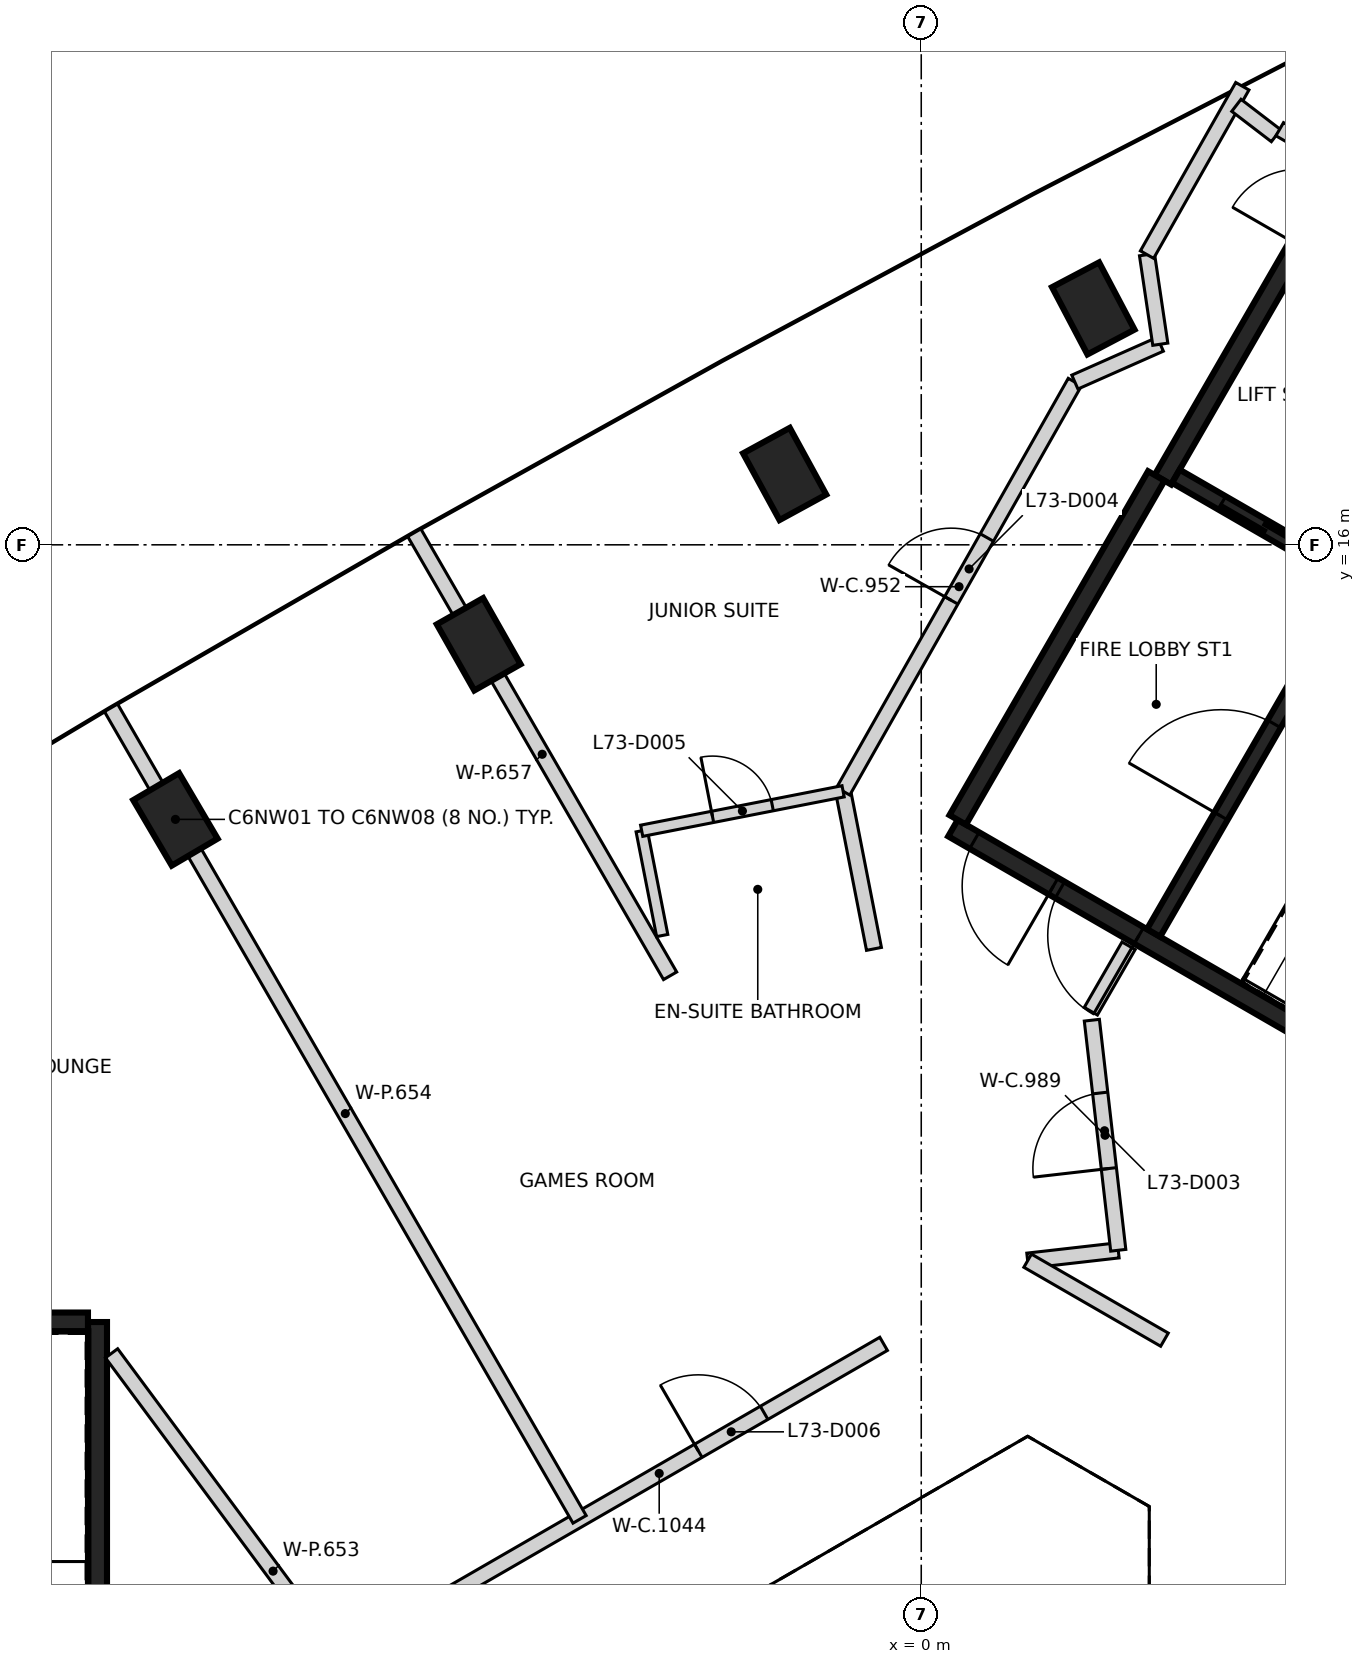
"""IFC4 building model, lengths in metres.
Left out: names, types, materials, properties, quantities, classifications, styles, units other than length and angle.
Written with IfcOpenShell. Run it as: python <this file> out.ifc"""

import sys

from ifc_helpers import new_model, si_unit, direction, frame, frame_2d, origin, origin_2d, place, context, subcontext, project, spatial, rectangle, extrude, element, fill, save


model = new_model("IFC4")
c1 = context("Model", 3, precision=1e-05, world=origin(), true_north=direction((0.0, 1.0)))
c2 = subcontext(c1, "Body", "Model", "MODEL_VIEW")
j1 = project(units=[si_unit("LENGTHUNIT", "METRE"), si_unit("PLANEANGLEUNIT", "RADIAN")], contexts=[c1])
p1 = place(None, origin())
s1 = spatial("IfcSite", under=j1, at=p1, CompositionType="ELEMENT")
p2 = place(p1, origin())
s2 = spatial("IfcBuilding", under=s1, at=p2, CompositionType="ELEMENT")
p3 = place(p2, frame((0.0, 0.0, 291.0)))
s3 = spatial("IfcBuildingStorey", under=s2, at=p3, CompositionType="ELEMENT", Elevation=291.0)
for number, where, z_axis, x_axis in (
    (1, (2.263, 19.11, -0.35), (0.0, 0.0, 1.0), (-0.466, 0.885, 0.0)),
    (2, (-1.797, 16.932, -0.35), (0.0, 0.0, 1.0), (-0.479, 0.878, 0.0)),
    (3, (-5.822, 14.691, -0.35), (0.0, 0.0, 1.0), (-0.493, 0.87, 0.0)),
    (4, (-9.812, 12.388, -0.35), (0.0, 0.0, 1.0), (-0.507, 0.862, 0.0)),
):
    element("IfcColumn", number, at=place(p3, frame(where, z_axis=z_axis, x_axis=x_axis)), inside=s3, PredefinedType="COLUMN", context=c2, shape_type="SweptSolid", body=[
        extrude(rectangle(XDim=1.0, YDim=0.7, at=origin_2d()), origin(), (0.0, 0.0, 1.0), 3.6),
    ])
p4 = place(p3, frame((-10.837, 5.775, 0.0), z_axis=(0.0, 0.0, 1.0), x_axis=(0.0, -1.0, 0.0)))
e5 = element("IfcWall", 5, at=p4, inside=s3, PredefinedType="SHEAR", context=c2, shape_type="SweptSolid", body=[
    extrude(rectangle(XDim=11.55, YDim=0.25, at=frame_2d((5.775, 0.0))), origin(), (0.0, 0.0, 1.0), 3.25),
])
p5 = place(p4, frame((10.025, 0.0, 0.0)))
e6 = element("IfcOpeningElement", 6, at=p5, cuts=e5, PredefinedType="OPENING", context=c2, shape_type="SweptSolid", body=[
    extrude(rectangle(XDim=1.2, YDim=2.1, at=frame_2d((0.6, 1.05))), frame((0.0, 0.135, 0.0), z_axis=(0.0, -1.0, 0.0), x_axis=(1.0, 0.0, 0.0)), (0.0, 0.0, 1.0), 0.27),
])
p6 = place(p4, frame((8.725, 0.0, 0.0)))
e7 = element("IfcOpeningElement", 7, at=p6, cuts=e5, PredefinedType="OPENING", context=c2, shape_type="SweptSolid", body=[
    extrude(rectangle(XDim=1.2, YDim=2.1, at=frame_2d((0.6, 1.05))), frame((0.0, 0.135, 0.0), z_axis=(0.0, -1.0, 0.0), x_axis=(1.0, 0.0, 0.0)), (0.0, 0.0, 1.0), 0.27),
])
p7 = place(p3, frame((-16.472, 5.775, 0.0), z_axis=(0.0, 0.0, 1.0), x_axis=(1.0, 0.0, 0.0)))
e8 = element("IfcWall", 8, at=p7, inside=s3, PredefinedType="SHEAR", context=c2, shape_type="SweptSolid", body=[
    extrude(rectangle(XDim=5.51, YDim=0.25, at=frame_2d((2.755, 0.0))), origin(), (0.0, 0.0, 1.0), 3.25),
])
p8 = place(p3, frame((10.42, 6.498, 0.0), z_axis=(0.0, 0.0, 1.0), x_axis=(-0.866021906294, 0.500006057782, 0.0)))
e9 = element("IfcWall", 9, at=p8, inside=s3, PredefinedType="SHEAR", context=c2, shape_type="SweptSolid", body=[
    extrude(rectangle(XDim=11.55, YDim=0.25, at=frame_2d((5.775, 0.0))), origin(), (0.0, 0.0, 1.0), 3.25),
])
p9 = place(p8, frame((10.025, 0.0, 0.0)))
e10 = element("IfcOpeningElement", 10, at=p9, cuts=e9, PredefinedType="OPENING", context=c2, shape_type="SweptSolid", body=[
    extrude(rectangle(XDim=1.2, YDim=2.1, at=frame_2d((0.6, 1.05))), frame((0.0, 0.135, 0.0), z_axis=(0.0, -1.0, 0.0), x_axis=(1.0, 0.0, 0.0)), (0.0, 0.0, 1.0), 0.27),
])
p10 = place(p8, frame((8.725, 0.0, 0.0)))
e11 = element("IfcOpeningElement", 11, at=p10, cuts=e9, PredefinedType="OPENING", context=c2, shape_type="SweptSolid", body=[
    extrude(rectangle(XDim=1.2, YDim=2.1, at=frame_2d((0.6, 1.05))), frame((0.0, 0.135, 0.0), z_axis=(0.0, -1.0, 0.0), x_axis=(1.0, 0.0, 0.0)), (0.0, 0.0, 1.0), 0.27),
])
p11 = place(p3, frame((3.179, 16.856, 0.0), z_axis=(0.0, 0.0, 1.0), x_axis=(0.500001955336, 0.866024274868, 0.0)))
e12 = element("IfcWall", 12, at=p11, inside=s3, PredefinedType="SHEAR", context=c2, shape_type="SweptSolid", body=[
    extrude(rectangle(XDim=6.125, YDim=0.25, at=frame_2d((3.062, 0.0))), origin(), (0.0, 0.0, 1.0), 3.25),
])
p12 = place(p11, frame((3.563, 0.0, 0.0)))
e13 = element("IfcOpeningElement", 13, at=p12, cuts=e12, PredefinedType="OPENING", context=c2, shape_type="SweptSolid", body=[
    extrude(rectangle(XDim=1.0, YDim=2.1, at=frame_2d((0.5, 1.05))), frame((0.0, 0.135, 0.0), z_axis=(0.0, -1.0, 0.0), x_axis=(1.0, 0.0, 0.0)), (0.0, 0.0, 1.0), 0.27),
])
p13 = place(p3, frame((0.48, 12.381, 0.0), z_axis=(0.0, 0.0, 1.0), x_axis=(0.49999885962, 0.866026062182, 0.0)))
e14 = element("IfcWall", 14, at=p13, inside=s3, PredefinedType="SHEAR", context=c2, shape_type="SweptSolid", body=[
    extrude(rectangle(XDim=5.225, YDim=0.25, at=frame_2d((2.612, 0.0))), origin(), (0.0, 0.0, 1.0), 3.25),
])
p14 = place(p3, frame((3.057, 10.895, 0.0), z_axis=(0.0, 0.0, 1.0), x_axis=(0.500027839223, 0.866009330205, 0.0)))
e15 = element("IfcWall", 15, at=p14, inside=s3, PredefinedType="SHEAR", context=c2, shape_type="SweptSolid", body=[
    extrude(rectangle(XDim=5.098, YDim=0.2, at=frame_2d((2.549, 0.0))), origin(), (0.0, 0.0, 1.0), 3.25),
])
p15 = place(p14, frame((1.774, 0.0, 0.0)))
e16 = element("IfcOpeningElement", 16, at=p15, cuts=e15, PredefinedType="OPENING", context=c2, shape_type="SweptSolid", body=[
    extrude(rectangle(XDim=1.4, YDim=2.1, at=frame_2d((0.7, 1.05))), frame((0.0, 0.11, 0.0), z_axis=(0.0, -1.0, 0.0), x_axis=(1.0, 0.0, 0.0)), (0.0, 0.0, 1.0), 0.22),
])
p16 = place(p3, frame((5.646, 15.576, 0.0), z_axis=(0.0, 0.0, 1.0), x_axis=(-0.866018407898, 0.500012117035, 0.0)))
e17 = element("IfcWall", 17, at=p16, inside=s3, PredefinedType="SHEAR", context=c2, shape_type="SweptSolid", body=[
    extrude(rectangle(XDim=2.651, YDim=0.2, at=frame_2d((1.325, 0.0))), origin(), (0.0, 0.0, 1.0), 3.25),
])
p17 = place(p16, frame((0.652, 0.0, 0.0)))
e18 = element("IfcOpeningElement", 18, at=p17, cuts=e17, PredefinedType="OPENING", context=c2, shape_type="SweptSolid", body=[
    extrude(rectangle(XDim=1.3, YDim=2.1, at=frame_2d((0.65, 1.05))), frame((0.0, 0.11, 0.0), z_axis=(0.0, -1.0, 0.0), x_axis=(1.0, 0.0, 0.0)), (0.0, 0.0, 1.0), 0.22),
])
p18 = place(p3, frame((-6.4, 2.079, 0.0), z_axis=(0.0, 0.0, 1.0), x_axis=(0.866037708501, 0.499978687001, 0.0)))
e19 = element("IfcWall", 19, at=p18, inside=s3, PredefinedType="PARTITIONING", context=c2, shape_type="SweptSolid", body=[
    extrude(rectangle(XDim=6.818, YDim=0.2, at=frame_2d((3.409, 0.0))), origin(), (0.0, 0.0, 1.0), 3.25),
])
p19 = place(p18, frame((4.003, 0.0, 0.0)))
e20 = element("IfcOpeningElement", 20, at=p19, cuts=e19, PredefinedType="OPENING", context=c2, shape_type="SweptSolid", body=[
    extrude(rectangle(XDim=1.0, YDim=2.1, at=frame_2d((0.5, 1.05))), frame((0.0, 0.11, 0.0), z_axis=(0.0, -1.0, 0.0), x_axis=(1.0, 0.0, 0.0)), (0.0, 0.0, 1.0), 0.22),
])
p20 = place(p3, frame((-1.028, 12.757, 0.0), z_axis=(0.0, 0.0, 1.0), x_axis=(0.192202773855, -0.981355233197, 0.0)))
e21 = element("IfcWall", 21, at=p20, inside=s3, PredefinedType="PARTITIONING", context=c2, shape_type="SweptSolid", body=[
    extrude(rectangle(XDim=2.112, YDim=0.2, at=frame_2d((1.056, 0.0))), origin(), (0.0, 0.0, 1.0), 3.25),
])
p21 = place(p3, frame((-1.027, 12.757, 0.0), z_axis=(0.0, 0.0, 1.0), x_axis=(0.492663063759, 0.870220147783, 0.0)))
e22 = element("IfcWall", 22, at=p21, inside=s3, PredefinedType="PARTITIONING", context=c2, shape_type="SweptSolid", body=[
    extrude(rectangle(XDim=6.187, YDim=0.2, at=frame_2d((3.094, 0.0))), origin(), (0.0, 0.0, 1.0), 3.25),
])
p22 = place(p21, frame((2.887, 0.0, 0.0)))
e23 = element("IfcOpeningElement", 23, at=p22, cuts=e22, PredefinedType="OPENING", context=c2, shape_type="SweptSolid", body=[
    extrude(rectangle(XDim=0.95, YDim=2.1, at=frame_2d((0.475, 1.05))), frame((0.0, 0.11, 0.0), z_axis=(0.0, -1.0, 0.0), x_axis=(1.0, 0.0, 0.0)), (0.0, 0.0, 1.0), 0.22),
])
p23 = place(p3, frame((1.4, 6.582, 0.0), z_axis=(0.0, 0.0, 1.0), x_axis=(0.993556915844, 0.11333426216, 0.0)))
e24 = element("IfcWall", 24, at=p23, inside=s3, PredefinedType="PARTITIONING", context=c2, shape_type="SweptSolid", body=[
    extrude(rectangle(XDim=1.2, YDim=0.2, at=frame_2d((0.6, 0.0))), origin(), (0.0, 0.0, 1.0), 3.25),
])
p24 = place(p3, frame((1.4, 6.582, 0.0), z_axis=(0.0, 0.0, 1.0), x_axis=(0.866066271601, -0.499929208183, 0.0)))
e25 = element("IfcWall", 25, at=p24, inside=s3, PredefinedType="PARTITIONING", context=c2, shape_type="SweptSolid", body=[
    extrude(rectangle(XDim=2.078, YDim=0.2, at=frame_2d((1.039, 0.0))), origin(), (0.0, 0.0, 1.0), 3.25),
])
p25 = place(p3, frame((2.021, 18.141, 0.0), z_axis=(0.0, 0.0, 1.0), x_axis=(0.914343087003, 0.404940389748, 0.0)))
e26 = element("IfcWall", 26, at=p25, inside=s3, PredefinedType="PARTITIONING", context=c2, shape_type="SweptSolid", body=[
    extrude(rectangle(XDim=1.229, YDim=0.2, at=frame_2d((0.615, 0.0))), origin(), (0.0, 0.0, 1.0), 3.25),
])
p26 = place(p3, frame((2.592, 6.719, 0.0), z_axis=(0.0, 0.0, 1.0), x_axis=(-0.114027951455, 0.993477541914, 0.0)))
e27 = element("IfcWall", 27, at=p26, inside=s3, PredefinedType="PARTITIONING", context=c2, shape_type="SweptSolid", body=[
    extrude(rectangle(XDim=3.047, YDim=0.2, at=frame_2d((1.523, 0.0))), origin(), (0.0, 0.0, 1.0), 3.25),
])
p27 = place(p26, frame((1.083, 0.0, 0.0)))
e28 = element("IfcOpeningElement", 28, at=p27, cuts=e27, PredefinedType="OPENING", context=c2, shape_type="SweptSolid", body=[
    extrude(rectangle(XDim=1.0, YDim=2.1, at=frame_2d((0.5, 1.05))), frame((0.0, 0.11, 0.0), z_axis=(0.0, -1.0, 0.0), x_axis=(1.0, 0.0, 0.0)), (0.0, 0.0, 1.0), 0.22),
])
p28 = place(p3, frame((2.231, 9.864, 0.0), z_axis=(0.0, 0.0, 1.0), x_axis=(0.499942098031, 0.866058830921, 0.0)))
e29 = element("IfcWall", 29, at=p28, inside=s3, PredefinedType="PARTITIONING", context=c2, shape_type="SweptSolid", body=[
    extrude(rectangle(XDim=0.994, YDim=0.2, at=frame_2d((0.497, 0.0))), origin(), (0.0, 0.0, 1.0), 3.25),
])
p29 = place(p3, frame((2.97, 19.817, 0.0), z_axis=(0.0, 0.0, 1.0), x_axis=(0.146986994932, -0.989138424752, 0.0)))
e30 = element("IfcWall", 30, at=p29, inside=s3, PredefinedType="PARTITIONING", context=c2, shape_type="SweptSolid", body=[
    extrude(rectangle(XDim=1.191, YDim=0.2, at=frame_2d((0.595, 0.0))), origin(), (0.0, 0.0, 1.0), 2.35),
])
p30 = place(p3, frame((2.97, 19.818, 0.0), z_axis=(0.0, 0.0, 1.0), x_axis=(0.492727027301, 0.870183932607, 0.0)))
e31 = element("IfcWall", 31, at=p30, inside=s3, PredefinedType="PARTITIONING", context=c2, shape_type="SweptSolid", body=[
    extrude(rectangle(XDim=2.546, YDim=0.2, at=frame_2d((1.273, 0.0))), origin(), (0.0, 0.0, 1.0), 3.25),
])
p31 = place(p3, frame((4.146, 21.782, 0.0), z_axis=(0.0, 0.0, 1.0), x_axis=(0.793977493121, -0.607947152652, 0.0)))
e32 = element("IfcWall", 32, at=p31, inside=s3, PredefinedType="PARTITIONING", context=c2, shape_type="SweptSolid", body=[
    extrude(rectangle(XDim=0.656, YDim=0.2, at=frame_2d((0.328, 0.0))), origin(), (0.0, 0.0, 1.0), 3.25),
])
p32 = place(p3, frame((4.716, 21.468, 0.0), z_axis=(0.0, 0.0, 1.0), x_axis=(0.865912682783, -0.500195187698, 0.0)))
e33 = element("IfcWall", 33, at=p32, inside=s3, PredefinedType="PARTITIONING", context=c2, shape_type="SweptSolid", body=[
    extrude(rectangle(XDim=0.79, YDim=0.2, at=frame_2d((0.395, 0.0))), origin(), (0.0, 0.0, 1.0), 3.25),
])
p33 = place(p3, frame((-10.652, 5.364, 0.0), z_axis=(0.0, 0.0, 1.0), x_axis=(0.595550732464, -0.803317698711, 0.0)))
e34 = element("IfcWall", 34, at=p33, inside=s3, PredefinedType="PARTITIONING", context=c2, shape_type="SweptSolid", body=[
    extrude(rectangle(XDim=7.135, YDim=0.2, at=frame_2d((3.567, 0.0))), origin(), (0.0, 0.0, 1.0), 3.25),
])
p34 = place(p3, frame((-10.659, 13.856, 0.0), z_axis=(0.0, 0.0, 1.0), x_axis=(0.500004723409, -0.866022676706, 0.0)))
e35 = element("IfcWall", 35, at=p34, inside=s3, PredefinedType="PARTITIONING", context=c2, shape_type="SweptSolid", body=[
    extrude(rectangle(XDim=12.329, YDim=0.2, at=frame_2d((6.164, 0.0))), origin(), (0.0, 0.0, 1.0), 3.25),
])
p35 = place(p3, frame((-6.67, 16.159, 0.0), z_axis=(0.0, 0.0, 1.0), x_axis=(0.50003223478, -0.866006792225, 0.0)))
e36 = element("IfcWall", 36, at=p35, inside=s3, PredefinedType="PARTITIONING", context=c2, shape_type="SweptSolid", body=[
    extrude(rectangle(XDim=6.731, YDim=0.2, at=frame_2d((3.365, 0.0))), origin(), (0.0, 0.0, 1.0), 3.25),
])
p36 = place(p3, frame((-3.678, 12.238, 0.0), z_axis=(0.0, 0.0, 1.0), x_axis=(0.192270029527, -0.981342058482, 0.0)))
e37 = element("IfcWall", 37, at=p36, inside=s3, PredefinedType="PARTITIONING", context=c2, shape_type="SweptSolid", body=[
    extrude(rectangle(XDim=1.404, YDim=0.15, at=frame_2d((0.702, 0.0))), origin(), (0.0, 0.0, 1.0), 3.25),
])
p37 = place(p3, frame((-3.678, 12.238, 0.0), z_axis=(0.0, 0.0, 1.0), x_axis=(0.98135189098, 0.192219837868, 0.0)))
e38 = element("IfcWall", 38, at=p37, inside=s3, PredefinedType="PARTITIONING", context=c2, shape_type="SweptSolid", body=[
    extrude(rectangle(XDim=2.7, YDim=0.15, at=frame_2d((1.35, 0.0))), origin(), (0.0, 0.0, 1.0), 3.25),
])
p38 = place(p37, frame((0.95, 0.0, 0.0)))
e39 = element("IfcOpeningElement", 39, at=p38, cuts=e38, PredefinedType="OPENING", context=c2, shape_type="SweptSolid", body=[
    extrude(rectangle(XDim=0.8, YDim=2.1, at=frame_2d((0.4, 1.05))), frame((0.0, 0.085, 0.0), z_axis=(0.0, -1.0, 0.0), x_axis=(1.0, 0.0, 0.0)), (0.0, 0.0, 1.0), 0.17),
])
p39 = place(p17, origin())
e40 = element("IfcDoor", 40, at=p39, inside=s3, OperationType="SLIDING_TO_LEFT", PredefinedType="DOOR", context=c2, shape_type="SweptSolid", body=[
    extrude(rectangle(XDim=1.3, YDim=2.1, at=frame_2d((0.65, 1.05))), frame((0.0, 0.025, 0.0), z_axis=(0.0, -1.0, 0.0), x_axis=(1.0, 0.0, 0.0)), (0.0, 0.0, 1.0), 0.05),
])
fill(e18, e40)
p40 = place(p9, origin())
e41 = element("IfcDoor", 41, at=p40, inside=s3, OperationType="SINGLE_SWING_LEFT", PredefinedType="DOOR", context=c2, shape_type="SweptSolid", body=[
    extrude(rectangle(XDim=1.2, YDim=2.1, at=frame_2d((0.6, 1.05))), frame((0.0, 0.025, 0.0), z_axis=(0.0, -1.0, 0.0), x_axis=(1.0, 0.0, 0.0)), (0.0, 0.0, 1.0), 0.05),
])
fill(e10, e41)
p41 = place(p10, origin())
e42 = element("IfcDoor", 42, at=p41, inside=s3, OperationType="SINGLE_SWING_RIGHT", PredefinedType="DOOR", context=c2, shape_type="SweptSolid", body=[
    extrude(rectangle(XDim=1.2, YDim=2.1, at=frame_2d((0.6, 1.05))), frame((0.0, 0.025, 0.0), z_axis=(0.0, -1.0, 0.0), x_axis=(1.0, 0.0, 0.0)), (0.0, 0.0, 1.0), 0.05),
])
fill(e11, e42)
p42 = place(p15, origin())
e43 = element("IfcDoor", 43, at=p42, inside=s3, OperationType="SINGLE_SWING_LEFT", PredefinedType="DOOR", context=c2, shape_type="SweptSolid", body=[
    extrude(rectangle(XDim=1.4, YDim=2.1, at=frame_2d((0.7, 1.05))), frame((0.0, 0.025, 0.0), z_axis=(0.0, -1.0, 0.0), x_axis=(1.0, 0.0, 0.0)), (0.0, 0.0, 1.0), 0.05),
])
fill(e16, e43)
p43 = place(p27, origin())
e44 = element("IfcDoor", 44, at=p43, inside=s3, OperationType="SINGLE_SWING_LEFT", PredefinedType="DOOR", context=c2, shape_type="SweptSolid", body=[
    extrude(rectangle(XDim=1.0, YDim=2.1, at=frame_2d((0.5, 1.05))), frame((0.0, 0.025, 0.0), z_axis=(0.0, -1.0, 0.0), x_axis=(1.0, 0.0, 0.0)), (0.0, 0.0, 1.0), 0.05),
])
fill(e28, e44)
p44 = place(p22, origin())
e45 = element("IfcDoor", 45, at=p44, inside=s3, OperationType="SINGLE_SWING_LEFT", PredefinedType="DOOR", context=c2, shape_type="SweptSolid", body=[
    extrude(rectangle(XDim=0.95, YDim=2.1, at=frame_2d((0.475, 1.05))), frame((0.0, 0.025, 0.0), z_axis=(0.0, -1.0, 0.0), x_axis=(1.0, 0.0, 0.0)), (0.0, 0.0, 1.0), 0.05),
])
fill(e23, e45)
p45 = place(p38, origin())
e46 = element("IfcDoor", 46, at=p45, inside=s3, OperationType="SINGLE_SWING_LEFT", PredefinedType="DOOR", context=c2, shape_type="SweptSolid", body=[
    extrude(rectangle(XDim=0.8, YDim=2.1, at=frame_2d((0.4, 1.05))), frame((0.0, 0.025, 0.0), z_axis=(0.0, -1.0, 0.0), x_axis=(1.0, 0.0, 0.0)), (0.0, 0.0, 1.0), 0.05),
])
fill(e39, e46)
p46 = place(p19, origin())
e47 = element("IfcDoor", 47, at=p46, inside=s3, OperationType="SINGLE_SWING_LEFT", PredefinedType="DOOR", context=c2, shape_type="SweptSolid", body=[
    extrude(rectangle(XDim=1.0, YDim=2.1, at=frame_2d((0.5, 1.05))), frame((0.0, 0.025, 0.0), z_axis=(0.0, -1.0, 0.0), x_axis=(1.0, 0.0, 0.0)), (0.0, 0.0, 1.0), 0.05),
])
fill(e20, e47)
save(model, sys.argv[1])
